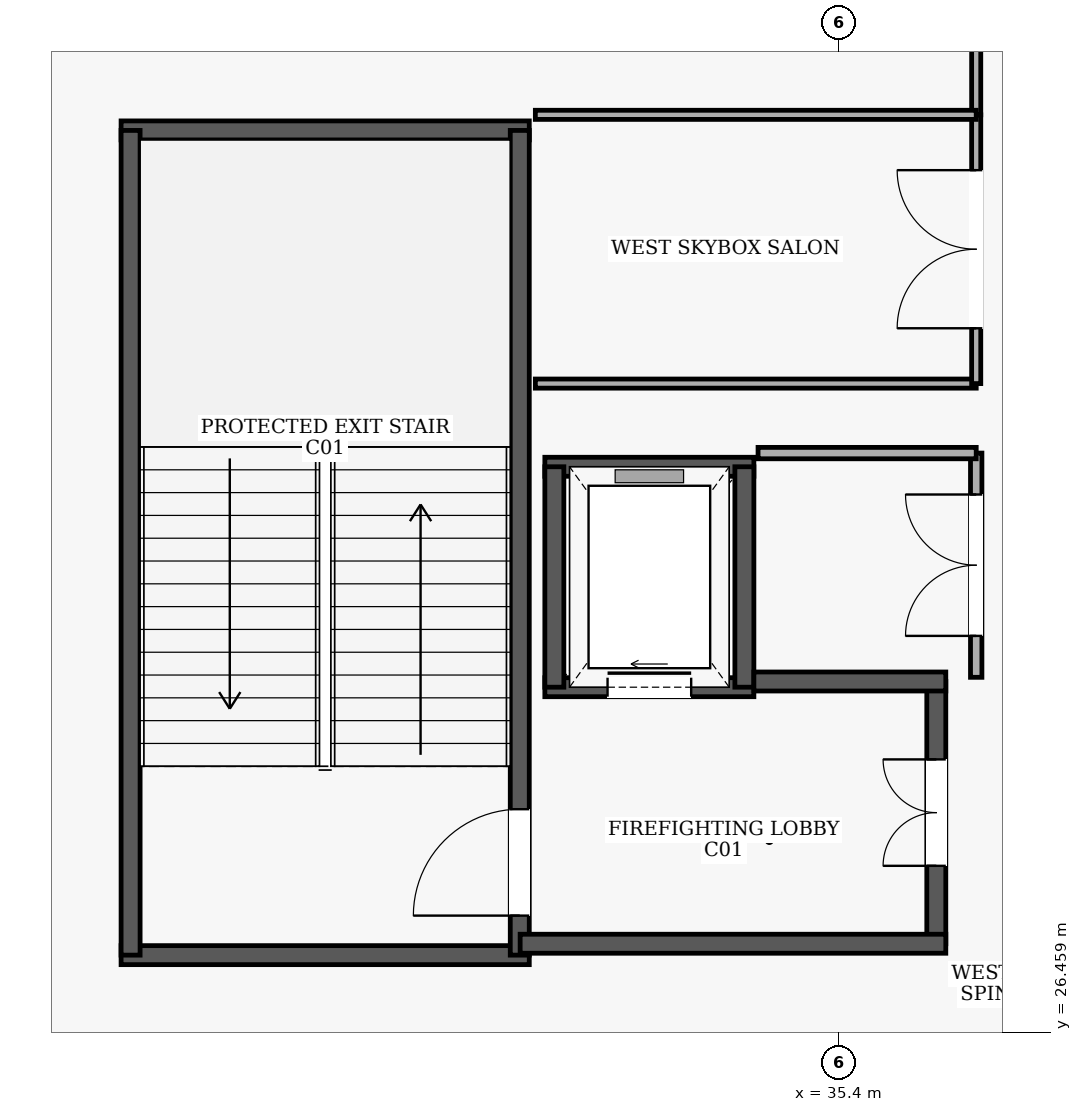
"""IFC4 building model, lengths in metres.
Left out: names, types, materials, properties, quantities, classifications, styles, units other than length and angle.
Written with IfcOpenShell. Run it as: python <this file> out.ifc"""

import sys

from ifc_helpers import new_model, si_unit, direction, frame, frame_2d, origin, place, context, subcontext, project, spatial, rectangle, extrude, element, fill, save


model = new_model("IFC4")
c1 = context("Model", 3, precision=1e-05, world=origin(), true_north=direction((0.0, 1.0)))
c2 = subcontext(c1, "Body", "Model", "MODEL_VIEW")
j1 = project(units=[si_unit("LENGTHUNIT", "METRE"), si_unit("PLANEANGLEUNIT", "RADIAN")], contexts=[c1])
p1 = place(None, origin())
s1 = spatial("IfcSite", under=j1, at=p1, CompositionType="ELEMENT")
p2 = place(p1, origin())
s2 = spatial("IfcBuilding", under=s1, at=p2, CompositionType="ELEMENT")
p3 = place(p2, frame((0.0, 0.0, 19.8)))
s3 = spatial("IfcBuildingStorey", under=s2, at=p3, CompositionType="ELEMENT", Elevation=19.8)
for number, where, z_axis, x_axis in (
    (1, (25.95, 27.475, 0.0), (0.0, 0.0, 1.0), (1.0, 0.0, 0.0)),
    (2, (31.32, 38.325, 0.0), (0.0, 0.0, 1.0), (-1.0, 0.0, 0.0)),
):
    element("IfcWall", number, at=place(p3, frame(where, z_axis=z_axis, x_axis=x_axis)), inside=s3, PredefinedType="SHEAR", context=c2, shape_type="SweptSolid", body=[
        extrude(rectangle(XDim=5.37, YDim=0.25, at=frame_2d((2.685, 0.0))), origin(), (0.0, 0.0, 1.0), 4.5),
    ])
p4 = place(p3, frame((26.075, 27.475, 0.0), z_axis=(0.0, 0.0, 1.0), x_axis=(0.0, 1.0, 0.0)))
e3 = element("IfcWall", 3, at=p4, inside=s3, PredefinedType="SHEAR", context=c2, shape_type="SweptSolid", body=[
    extrude(rectangle(XDim=10.85, YDim=0.25, at=frame_2d((5.425, 0.0))), origin(), (0.0, 0.0, 1.0), 4.5),
])
p5 = place(p3, frame((31.195, 27.475, 0.0), z_axis=(0.0, 0.0, 1.0), x_axis=(0.0, 1.0, 0.0)))
e4 = element("IfcWall", 4, at=p5, inside=s3, PredefinedType="SHEAR", context=c2, shape_type="SweptSolid", body=[
    extrude(rectangle(XDim=10.85, YDim=0.25, at=frame_2d((5.425, 0.0))), origin(), (0.0, 0.0, 1.0), 4.5),
])
p6 = place(p5, frame((0.52, 0.0, 0.0)))
e5 = element("IfcOpeningElement", 5, at=p6, cuts=e4, PredefinedType="OPENING", context=c2, shape_type="SweptSolid", body=[
    extrude(rectangle(XDim=1.4, YDim=2.15, at=frame_2d((0.7, 1.075))), frame((0.0, 0.135, 0.0), z_axis=(0.0, -1.0, 0.0), x_axis=(1.0, 0.0, 0.0)), (0.0, 0.0, 1.0), 0.27),
])
p7 = place(p3, frame((31.525, 31.0, 0.0), z_axis=(0.0, 0.0, 1.0), x_axis=(1.0, 0.0, 0.0)))
e6 = element("IfcWall", 6, at=p7, inside=s3, PredefinedType="SHEAR", context=c2, shape_type="SweptSolid", body=[
    extrude(rectangle(XDim=2.75, YDim=0.25, at=frame_2d((1.375, 0.0))), origin(), (0.0, 0.0, 1.0), 4.5),
])
p8 = place(p7, frame((0.825, 0.0, 0.0)))
e7 = element("IfcOpeningElement", 7, at=p8, cuts=e6, PredefinedType="OPENING", context=c2, shape_type="SweptSolid", body=[
    extrude(rectangle(XDim=1.1, YDim=2.15, at=frame_2d((0.55, 1.075))), frame((0.0, 0.135, 0.0), z_axis=(0.0, -1.0, 0.0), x_axis=(1.0, 0.0, 0.0)), (0.0, 0.0, 1.0), 0.27),
])
p9 = place(p3, frame((34.275, 33.9, 0.0), z_axis=(0.0, 0.0, 1.0), x_axis=(-1.0, 0.0, 0.0)))
e8 = element("IfcWall", 8, at=p9, inside=s3, PredefinedType="SHEAR", context=c2, shape_type="SweptSolid", body=[
    extrude(rectangle(XDim=2.75, YDim=0.25, at=frame_2d((1.375, 0.0))), origin(), (0.0, 0.0, 1.0), 4.5),
])
for number, where, z_axis, x_axis in (
    (9, (31.65, 33.9, 0.0), (0.0, 0.0, 1.0), (0.0, -1.0, 0.0)),
    (10, (34.15, 31.0, 0.0), (0.0, 0.0, 1.0), (0.0, 1.0, 0.0)),
):
    element("IfcWall", number, at=place(p3, frame(where, z_axis=z_axis, x_axis=x_axis)), inside=s3, PredefinedType="SHEAR", context=c2, shape_type="SweptSolid", body=[
        extrude(rectangle(XDim=2.9, YDim=0.25, at=frame_2d((1.45, 0.0))), origin(), (0.0, 0.0, 1.0), 4.5),
    ])
p10 = place(p3, frame((36.675, 27.625, 0.0), z_axis=(0.0, 0.0, 1.0), x_axis=(0.0, 1.0, 0.0)))
e11 = element("IfcWall", 11, at=p10, inside=s3, PredefinedType="SHEAR", context=c2, shape_type="SweptSolid", body=[
    extrude(rectangle(XDim=3.45, YDim=0.25, at=frame_2d((1.725, 0.0))), origin(), (0.0, 0.0, 1.0), 4.5),
])
p11 = place(p10, frame((1.025, 0.0, 0.0)))
e12 = element("IfcOpeningElement", 12, at=p11, cuts=e11, PredefinedType="OPENING", context=c2, shape_type="SweptSolid", body=[
    extrude(rectangle(XDim=1.4, YDim=2.15, at=frame_2d((0.7, 1.075))), frame((0.0, 0.135, 0.0), z_axis=(0.0, -1.0, 0.0), x_axis=(1.0, 0.0, 0.0)), (0.0, 0.0, 1.0), 0.27),
])
p12 = place(p3, frame((34.275, 31.075, 0.0), z_axis=(0.0, 0.0, 1.0), x_axis=(1.0, 0.0, 0.0)))
e13 = element("IfcWall", 13, at=p12, inside=s3, PredefinedType="SHEAR", context=c2, shape_type="SweptSolid", body=[
    extrude(rectangle(XDim=2.525, YDim=0.25, at=frame_2d((1.263, 0.0))), origin(), (0.0, 0.0, 1.0), 4.5),
])
p13 = place(p3, frame((31.2, 27.625, 0.0), z_axis=(0.0, 0.0, 1.0), x_axis=(1.0, 0.0, 0.0)))
e14 = element("IfcWall", 14, at=p13, inside=s3, PredefinedType="SHEAR", context=c2, shape_type="SweptSolid", body=[
    extrude(rectangle(XDim=5.6, YDim=0.25, at=frame_2d((2.8, 0.0))), origin(), (0.0, 0.0, 1.0), 4.5),
])
p14 = place(p3, frame((37.2, 31.13, 0.0), z_axis=(0.0, 0.0, 1.0), x_axis=(0.0, 1.0, 0.0)))
e15 = element("IfcWall", 15, at=p14, inside=s3, PredefinedType="PARTITIONING", context=c2, shape_type="SweptSolid", body=[
    extrude(rectangle(XDim=2.95, YDim=0.15, at=frame_2d((1.475, 0.0))), origin(), (0.0, 0.0, 1.0), 4.5),
])
p15 = place(p14, frame((0.545, 0.0, 0.0)))
e16 = element("IfcOpeningElement", 16, at=p15, cuts=e15, PredefinedType="OPENING", context=c2, shape_type="SweptSolid", body=[
    extrude(rectangle(XDim=1.86, YDim=2.3, at=frame_2d((0.93, 1.15))), frame((0.0, 0.085, 0.0), z_axis=(0.0, -1.0, 0.0), x_axis=(1.0, 0.0, 0.0)), (0.0, 0.0, 1.0), 0.17),
])
p16 = place(p3, frame((37.2, 34.08, 0.0), z_axis=(0.0, 0.0, 1.0), x_axis=(-1.0, 0.0, 0.0)))
e17 = element("IfcWall", 17, at=p16, inside=s3, PredefinedType="PARTITIONING", context=c2, shape_type="SweptSolid", body=[
    extrude(rectangle(XDim=2.87, YDim=0.15, at=frame_2d((1.435, 0.0))), origin(), (0.0, 0.0, 1.0), 4.5),
])
p17 = place(p3, frame((37.2, 38.53, 0.0), z_axis=(0.0, 0.0, 1.0), x_axis=(0.0, 1.0, 0.0)))
e18 = element("IfcWall", 18, at=p17, inside=s3, PredefinedType="PARTITIONING", context=c2, shape_type="SweptSolid", body=[
    extrude(rectangle(XDim=3.14, YDim=0.12, at=frame_2d((1.57, 0.0))), origin(), (0.0, 0.0, 1.0), 4.5),
])
p18 = place(p17, frame((1.11, 0.0, 0.0)))
e19 = element("IfcOpeningElement", 19, at=p18, cuts=e18, PredefinedType="OPENING", context=c2, shape_type="SweptSolid", body=[
    extrude(rectangle(XDim=0.92, YDim=2.1, at=frame_2d((0.46, 1.05))), frame((0.0, 0.07, 0.0), z_axis=(0.0, -1.0, 0.0), x_axis=(1.0, 0.0, 0.0)), (0.0, 0.0, 1.0), 0.14),
])
p19 = place(p3, frame((31.4, 34.994, 0.0), z_axis=(0.0, 0.0, 1.0), x_axis=(1.0, 0.0, 0.0)))
e20 = element("IfcWall", 20, at=p19, inside=s3, PredefinedType="PARTITIONING", context=c2, shape_type="SweptSolid", body=[
    extrude(rectangle(XDim=5.8, YDim=0.12, at=frame_2d((2.9, 0.0))), origin(), (0.0, 0.0, 1.0), 4.5),
])
p20 = place(p3, frame((37.2, 34.994, 0.0), z_axis=(0.0, 0.0, 1.0), x_axis=(0.0, 1.0, 0.0)))
e21 = element("IfcWall", 21, at=p20, inside=s3, PredefinedType="PARTITIONING", context=c2, shape_type="SweptSolid", body=[
    extrude(rectangle(XDim=3.536, YDim=0.12, at=frame_2d((1.768, 0.0))), origin(), (0.0, 0.0, 1.0), 4.5),
])
p21 = place(p20, frame((0.728, 0.0, 0.0)))
e22 = element("IfcOpeningElement", 22, at=p21, cuts=e21, PredefinedType="OPENING", context=c2, shape_type="SweptSolid", body=[
    extrude(rectangle(XDim=2.08, YDim=2.35, at=frame_2d((1.04, 1.175))), frame((0.0, 0.07, 0.0), z_axis=(0.0, -1.0, 0.0), x_axis=(1.0, 0.0, 0.0)), (0.0, 0.0, 1.0), 0.14),
])
p22 = place(p3, frame((37.2, 38.53, 0.0), z_axis=(0.0, 0.0, 1.0), x_axis=(-1.0, 0.0, 0.0)))
e23 = element("IfcWall", 23, at=p22, inside=s3, PredefinedType="PARTITIONING", context=c2, shape_type="SweptSolid", body=[
    extrude(rectangle(XDim=5.8, YDim=0.12, at=frame_2d((2.9, 0.0))), origin(), (0.0, 0.0, 1.0), 4.5),
])
p23 = place(p6, origin())
e24 = element("IfcDoor", 24, at=p23, inside=s3, OperationType="SINGLE_SWING_LEFT", PredefinedType="DOOR", context=c2, shape_type="SweptSolid", body=[
    extrude(rectangle(XDim=1.4, YDim=2.15, at=frame_2d((0.7, 1.075))), frame((0.0, 0.025, 0.0), z_axis=(0.0, -1.0, 0.0), x_axis=(1.0, 0.0, 0.0)), (0.0, 0.0, 1.0), 0.05),
])
fill(e5, e24)
p24 = place(p8, origin())
e25 = element("IfcDoor", 25, at=p24, inside=s3, OperationType="SLIDING_TO_RIGHT", PredefinedType="DOOR", context=c2, shape_type="SweptSolid", body=[
    extrude(rectangle(XDim=1.1, YDim=2.15, at=frame_2d((0.55, 1.075))), frame((0.0, 0.025, 0.0), z_axis=(0.0, -1.0, 0.0), x_axis=(1.0, 0.0, 0.0)), (0.0, 0.0, 1.0), 0.05),
])
fill(e7, e25)
p25 = place(p11, origin())
e26 = element("IfcDoor", 26, at=p25, inside=s3, OperationType="DOUBLE_DOOR_SINGLE_SWING", PredefinedType="DOOR", context=c2, shape_type="SweptSolid", body=[
    extrude(rectangle(XDim=1.4, YDim=2.15, at=frame_2d((0.7, 1.075))), frame((0.0, 0.025, 0.0), z_axis=(0.0, -1.0, 0.0), x_axis=(1.0, 0.0, 0.0)), (0.0, 0.0, 1.0), 0.05),
])
fill(e12, e26)
p26 = place(p15, origin())
e27 = element("IfcDoor", 27, at=p26, inside=s3, OperationType="DOUBLE_DOOR_SINGLE_SWING", PredefinedType="DOOR", context=c2, shape_type="SweptSolid", body=[
    extrude(rectangle(XDim=1.86, YDim=2.3, at=frame_2d((0.93, 1.15))), frame((0.0, 0.025, 0.0), z_axis=(0.0, -1.0, 0.0), x_axis=(1.0, 0.0, 0.0)), (0.0, 0.0, 1.0), 0.05),
])
fill(e16, e27)
p27 = place(p21, origin())
e28 = element("IfcDoor", 28, at=p27, inside=s3, OperationType="DOUBLE_DOOR_SINGLE_SWING", PredefinedType="DOOR", context=c2, shape_type="SweptSolid", body=[
    extrude(rectangle(XDim=2.08, YDim=2.35, at=frame_2d((1.04, 1.175))), frame((0.0, 0.025, 0.0), z_axis=(0.0, -1.0, 0.0), x_axis=(1.0, 0.0, 0.0)), (0.0, 0.0, 1.0), 0.05),
])
fill(e22, e28)
save(model, sys.argv[1])
